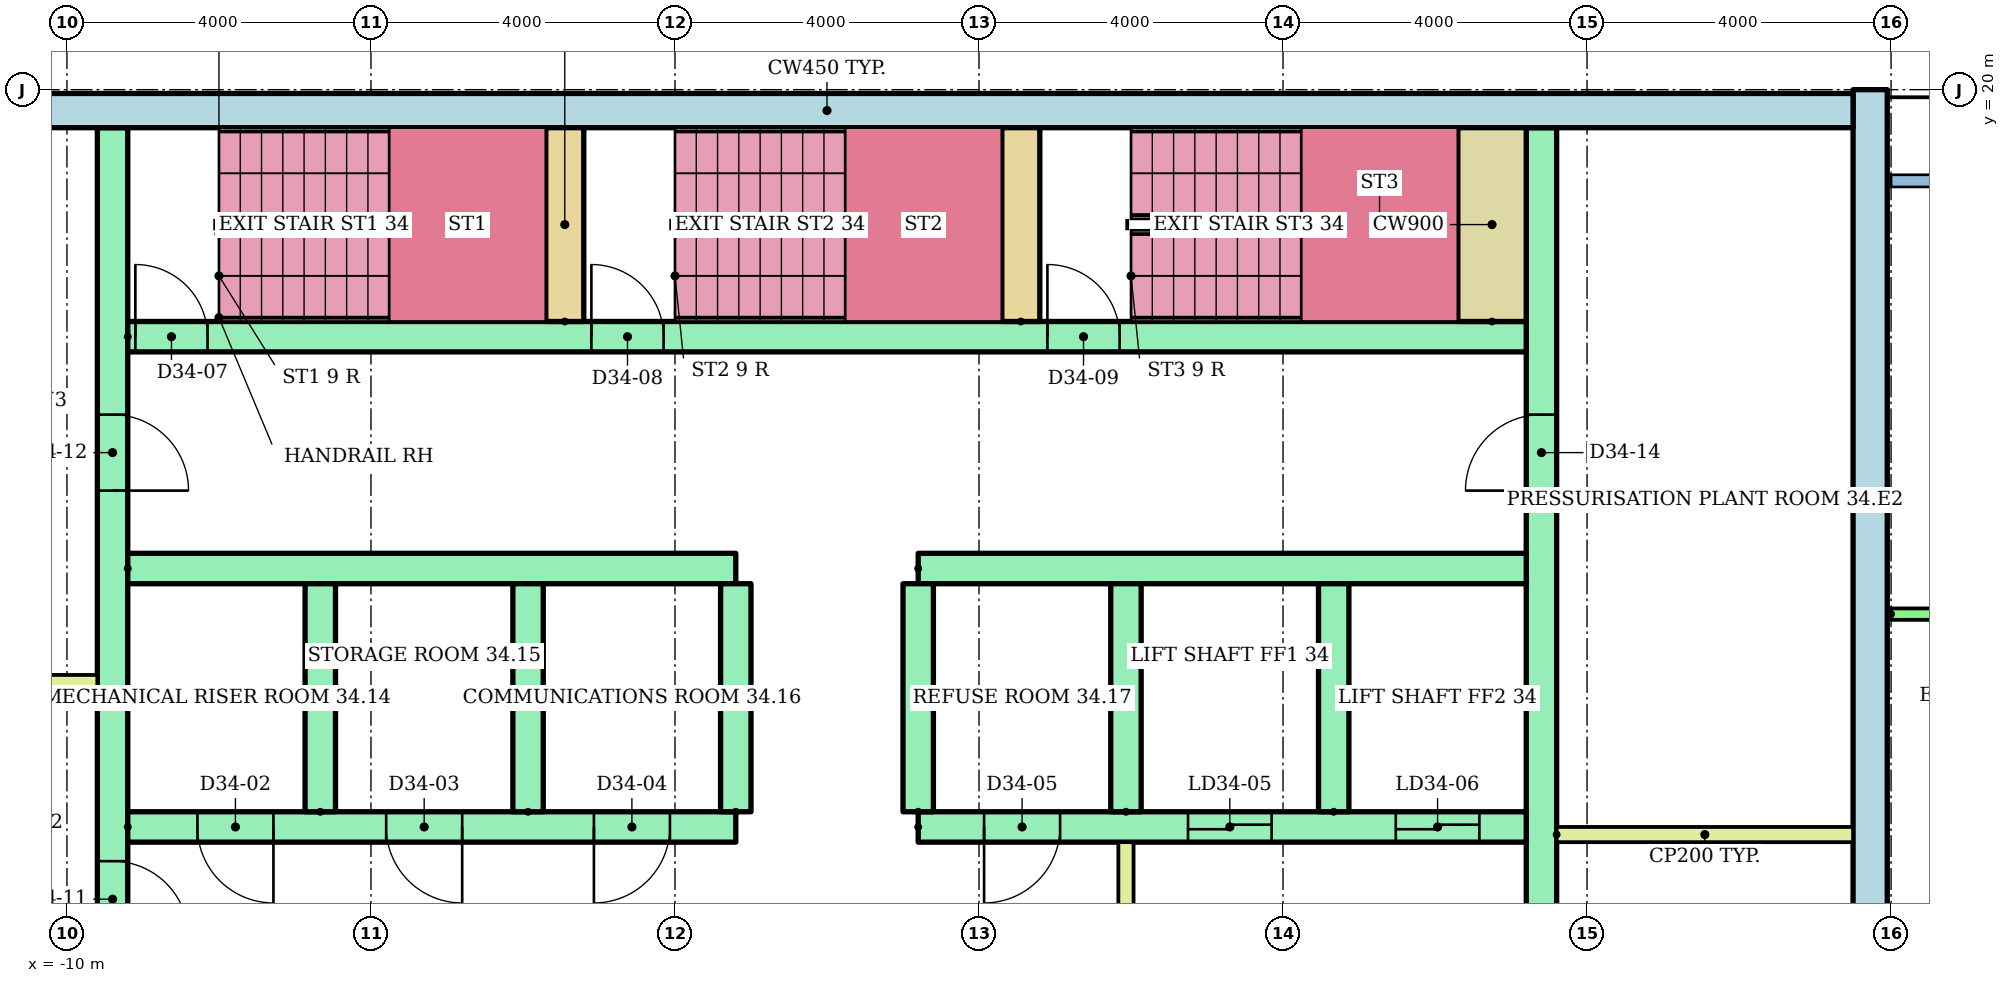
"""IFC4 building model, lengths in metres.
Left out: names, types, materials, properties, quantities, classifications, styles, units other than length and angle.
Written with IfcOpenShell. Run it as: python <this file> out.ifc"""

import sys

from ifc_helpers import new_model, si_unit, direction, frame, frame_2d, origin, place, context, subcontext, project, spatial, rectangle, extrude, element, fill, save


model = new_model("IFC4")
c1 = context("Model", 3, precision=1e-05, world=origin(), true_north=direction((0.0, 1.0)))
c2 = subcontext(c1, "Body", "Model", "MODEL_VIEW")
j1 = project(units=[si_unit("LENGTHUNIT", "METRE"), si_unit("PLANEANGLEUNIT", "RADIAN")], contexts=[c1])
p1 = place(None, origin())
s1 = spatial("IfcSite", under=j1, at=p1, CompositionType="ELEMENT")
p2 = place(p1, origin())
s2 = spatial("IfcBuilding", under=s1, at=p2, CompositionType="ELEMENT")
p3 = place(p2, frame((0.0, 0.0, 132.6)))
s3 = spatial("IfcBuildingStorey", under=s2, at=p3, CompositionType="ELEMENT", Elevation=132.6)
p4 = place(p3, frame((13.725, 3.0, 0.0), z_axis=(0.0, 0.0, 1.0), x_axis=(0.0, 1.0, 0.0)))
e1 = element("IfcWall", 1, at=p4, inside=s3, PredefinedType="SHEAR", context=c2, shape_type="SweptSolid", body=[
    extrude(rectangle(XDim=17.0, YDim=0.45, at=frame_2d((8.5, 0.0))), origin(), (0.0, 0.0, 1.0), 2.92),
])
p5 = place(p3, frame((-13.5, 19.725, 0.0)))
e2 = element("IfcWall", 2, at=p5, inside=s3, PredefinedType="SHEAR", context=c2, shape_type="SweptSolid", body=[
    extrude(rectangle(XDim=27.0, YDim=0.45, at=frame_2d((13.5, 0.0))), origin(), (0.0, 0.0, 1.0), 2.92),
])
p6 = place(p3, frame((-9.4, 6.8, 0.0), z_axis=(0.0, 0.0, 1.0), x_axis=(0.0, 1.0, 0.0)))
e3 = element("IfcWall", 3, at=p6, inside=s3, PredefinedType="SHEAR", context=c2, shape_type="SweptSolid", body=[
    extrude(rectangle(XDim=12.7, YDim=0.4, at=frame_2d((6.35, 0.0))), origin(), (0.0, 0.0, 1.0), 2.92),
])
p7 = place(p6, frame((0.3, 0.0, 0.0)))
e4 = element("IfcOpeningElement", 4, at=p7, cuts=e3, PredefinedType="OPENING", context=c2, shape_type="SweptSolid", body=[
    extrude(rectangle(XDim=1.0, YDim=2.1, at=frame_2d((0.5, 1.05))), frame((0.0, 0.21, 0.0), z_axis=(0.0, -1.0, 0.0), x_axis=(1.0, 0.0, 0.0)), (0.0, 0.0, 1.0), 0.42),
])
p8 = place(p6, frame((2.05, 0.0, 0.0)))
e5 = element("IfcOpeningElement", 5, at=p8, cuts=e3, PredefinedType="OPENING", context=c2, shape_type="SweptSolid", body=[
    extrude(rectangle(XDim=1.0, YDim=2.1, at=frame_2d((0.5, 1.05))), frame((0.0, 0.21, 0.0), z_axis=(0.0, -1.0, 0.0), x_axis=(1.0, 0.0, 0.0)), (0.0, 0.0, 1.0), 0.42),
])
p9 = place(p6, frame((7.925, 0.0, 0.0)))
e6 = element("IfcOpeningElement", 6, at=p9, cuts=e3, PredefinedType="OPENING", context=c2, shape_type="SweptSolid", body=[
    extrude(rectangle(XDim=1.0, YDim=2.1, at=frame_2d((0.5, 1.05))), frame((0.0, 0.21, 0.0), z_axis=(0.0, -1.0, 0.0), x_axis=(1.0, 0.0, 0.0)), (0.0, 0.0, 1.0), 0.42),
])
p10 = place(p3, frame((9.4, 6.8, 0.0), z_axis=(0.0, 0.0, 1.0), x_axis=(0.0, 1.0, 0.0)))
e7 = element("IfcWall", 7, at=p10, inside=s3, PredefinedType="SHEAR", context=c2, shape_type="SweptSolid", body=[
    extrude(rectangle(XDim=12.7, YDim=0.4, at=frame_2d((6.35, 0.0))), origin(), (0.0, 0.0, 1.0), 2.92),
])
p11 = place(p10, frame((1.15, 0.0, 0.0)))
e8 = element("IfcOpeningElement", 8, at=p11, cuts=e7, PredefinedType="OPENING", context=c2, shape_type="SweptSolid", body=[
    extrude(rectangle(XDim=1.0, YDim=2.1, at=frame_2d((0.5, 1.05))), frame((0.0, 0.21, 0.0), z_axis=(0.0, -1.0, 0.0), x_axis=(1.0, 0.0, 0.0)), (0.0, 0.0, 1.0), 0.42),
])
p12 = place(p10, frame((7.925, 0.0, 0.0)))
e9 = element("IfcOpeningElement", 9, at=p12, cuts=e7, PredefinedType="OPENING", context=c2, shape_type="SweptSolid", body=[
    extrude(rectangle(XDim=1.0, YDim=2.1, at=frame_2d((0.5, 1.05))), frame((0.0, 0.21, 0.0), z_axis=(0.0, -1.0, 0.0), x_axis=(1.0, 0.0, 0.0)), (0.0, 0.0, 1.0), 0.42),
])
p13 = place(p3, frame((-9.2, 10.3, 0.0)))
e10 = element("IfcWall", 10, at=p13, inside=s3, PredefinedType="SHEAR", context=c2, shape_type="SweptSolid", body=[
    extrude(rectangle(XDim=8.0, YDim=0.4, at=frame_2d((4.0, 0.0))), origin(), (0.0, 0.0, 1.0), 2.92),
])
p14 = place(p13, frame((0.917, 0.0, 0.0)))
e11 = element("IfcOpeningElement", 11, at=p14, cuts=e10, PredefinedType="OPENING", context=c2, shape_type="SweptSolid", body=[
    extrude(rectangle(XDim=1.0, YDim=2.1, at=frame_2d((0.5, 1.05))), frame((0.0, 0.21, 0.0), z_axis=(0.0, -1.0, 0.0), x_axis=(1.0, 0.0, 0.0)), (0.0, 0.0, 1.0), 0.42),
])
p15 = place(p13, frame((3.4, 0.0, 0.0)))
e12 = element("IfcOpeningElement", 12, at=p15, cuts=e10, PredefinedType="OPENING", context=c2, shape_type="SweptSolid", body=[
    extrude(rectangle(XDim=1.0, YDim=2.1, at=frame_2d((0.5, 1.05))), frame((0.0, 0.21, 0.0), z_axis=(0.0, -1.0, 0.0), x_axis=(1.0, 0.0, 0.0)), (0.0, 0.0, 1.0), 0.42),
])
p16 = place(p13, frame((6.133, 0.0, 0.0)))
e13 = element("IfcOpeningElement", 13, at=p16, cuts=e10, PredefinedType="OPENING", context=c2, shape_type="SweptSolid", body=[
    extrude(rectangle(XDim=1.0, YDim=2.1, at=frame_2d((0.5, 1.05))), frame((0.0, 0.21, 0.0), z_axis=(0.0, -1.0, 0.0), x_axis=(1.0, 0.0, 0.0)), (0.0, 0.0, 1.0), 0.42),
])
p17 = place(p3, frame((-9.2, 13.7, 0.0)))
e14 = element("IfcWall", 14, at=p17, inside=s3, PredefinedType="SHEAR", context=c2, shape_type="SweptSolid", body=[
    extrude(rectangle(XDim=8.0, YDim=0.4, at=frame_2d((4.0, 0.0))), origin(), (0.0, 0.0, 1.0), 2.92),
])
p18 = place(p3, frame((1.2, 10.3, 0.0)))
e15 = element("IfcWall", 15, at=p18, inside=s3, PredefinedType="SHEAR", context=c2, shape_type="SweptSolid", body=[
    extrude(rectangle(XDim=8.0, YDim=0.4, at=frame_2d((4.0, 0.0))), origin(), (0.0, 0.0, 1.0), 2.92),
])
p19 = place(p18, frame((3.55, 0.0, 0.0)))
e16 = element("IfcOpeningElement", 16, at=p19, cuts=e15, PredefinedType="OPENING", context=c2, shape_type="SweptSolid", body=[
    extrude(rectangle(XDim=1.1, YDim=2.1, at=frame_2d((0.55, 1.05))), frame((0.0, 0.21, 0.0), z_axis=(0.0, -1.0, 0.0), x_axis=(1.0, 0.0, 0.0)), (0.0, 0.0, 1.0), 0.42),
])
p20 = place(p18, frame((6.283, 0.0, 0.0)))
e17 = element("IfcOpeningElement", 17, at=p20, cuts=e15, PredefinedType="OPENING", context=c2, shape_type="SweptSolid", body=[
    extrude(rectangle(XDim=1.1, YDim=2.1, at=frame_2d((0.55, 1.05))), frame((0.0, 0.21, 0.0), z_axis=(0.0, -1.0, 0.0), x_axis=(1.0, 0.0, 0.0)), (0.0, 0.0, 1.0), 0.42),
])
p21 = place(p18, frame((0.867, 0.0, 0.0)))
e18 = element("IfcOpeningElement", 18, at=p21, cuts=e15, PredefinedType="OPENING", context=c2, shape_type="SweptSolid", body=[
    extrude(rectangle(XDim=1.0, YDim=2.1, at=frame_2d((0.5, 1.05))), frame((0.0, 0.21, 0.0), z_axis=(0.0, -1.0, 0.0), x_axis=(1.0, 0.0, 0.0)), (0.0, 0.0, 1.0), 0.42),
])
p22 = place(p3, frame((1.2, 13.7, 0.0)))
e19 = element("IfcWall", 19, at=p22, inside=s3, PredefinedType="SHEAR", context=c2, shape_type="SweptSolid", body=[
    extrude(rectangle(XDim=8.0, YDim=0.4, at=frame_2d((4.0, 0.0))), origin(), (0.0, 0.0, 1.0), 2.92),
])
for number, where, z_axis, x_axis in (
    (20, (-6.667, 10.5, 0.0), (0.0, 0.0, 1.0), (0.0, 1.0, 0.0)),
    (21, (-3.933, 10.5, 0.0), (0.0, 0.0, 1.0), (0.0, 1.0, 0.0)),
    (22, (-1.2, 10.5, 0.0), (0.0, 0.0, 1.0), (0.0, 1.0, 0.0)),
    (23, (1.2, 10.5, 0.0), (0.0, 0.0, 1.0), (0.0, 1.0, 0.0)),
    (24, (3.933, 10.5, 0.0), (0.0, 0.0, 1.0), (0.0, 1.0, 0.0)),
    (25, (6.667, 10.5, 0.0), (0.0, 0.0, 1.0), (0.0, 1.0, 0.0)),
):
    element("IfcWall", number, at=place(p3, frame(where, z_axis=z_axis, x_axis=x_axis)), inside=s3, PredefinedType="SHEAR", context=c2, shape_type="SweptSolid", body=[
        extrude(rectangle(XDim=3.0, YDim=0.4, at=frame_2d((1.5, 0.0))), origin(), (0.0, 0.0, 1.0), 2.92),
    ])
p23 = place(p3, frame((3.933, 6.8, 0.0), z_axis=(0.0, 0.0, 1.0), x_axis=(0.0, 1.0, 0.0)))
e26 = element("IfcWall", 26, at=p23, inside=s3, PredefinedType="PARTITIONING", context=c2, shape_type="SweptSolid", body=[
    extrude(rectangle(XDim=3.3, YDim=0.2, at=frame_2d((1.65, 0.0))), origin(), (0.0, 0.0, 1.0), 2.92),
])
p24 = place(p23, frame((1.1, 0.0, 0.0)))
e27 = element("IfcOpeningElement", 27, at=p24, cuts=e26, PredefinedType="OPENING", context=c2, shape_type="SweptSolid", body=[
    extrude(rectangle(XDim=1.1, YDim=2.1, at=frame_2d((0.55, 1.05))), frame((0.0, 0.11, 0.0), z_axis=(0.0, -1.0, 0.0), x_axis=(1.0, 0.0, 0.0)), (0.0, 0.0, 1.0), 0.22),
])
p25 = place(p3, frame((-9.2, 16.75, 0.0)))
e28 = element("IfcWall", 28, at=p25, inside=s3, PredefinedType="SHEAR", context=c2, shape_type="SweptSolid", body=[
    extrude(rectangle(XDim=18.4, YDim=0.4, at=frame_2d((9.2, 0.0))), origin(), (0.0, 0.0, 1.0), 2.92),
])
p26 = place(p25, frame((0.1, 0.0, 0.0)))
e29 = element("IfcOpeningElement", 29, at=p26, cuts=e28, PredefinedType="OPENING", context=c2, shape_type="SweptSolid", body=[
    extrude(rectangle(XDim=0.95, YDim=2.1, at=frame_2d((0.475, 1.05))), frame((0.0, 0.21, 0.0), z_axis=(0.0, -1.0, 0.0), x_axis=(1.0, 0.0, 0.0)), (0.0, 0.0, 1.0), 0.42),
])
p27 = place(p25, frame((6.1, 0.0, 0.0)))
e30 = element("IfcOpeningElement", 30, at=p27, cuts=e28, PredefinedType="OPENING", context=c2, shape_type="SweptSolid", body=[
    extrude(rectangle(XDim=0.95, YDim=2.1, at=frame_2d((0.475, 1.05))), frame((0.0, 0.21, 0.0), z_axis=(0.0, -1.0, 0.0), x_axis=(1.0, 0.0, 0.0)), (0.0, 0.0, 1.0), 0.42),
])
p28 = place(p25, frame((12.1, 0.0, 0.0)))
e31 = element("IfcOpeningElement", 31, at=p28, cuts=e28, PredefinedType="OPENING", context=c2, shape_type="SweptSolid", body=[
    extrude(rectangle(XDim=0.95, YDim=2.1, at=frame_2d((0.475, 1.05))), frame((0.0, 0.21, 0.0), z_axis=(0.0, -1.0, 0.0), x_axis=(1.0, 0.0, 0.0)), (0.0, 0.0, 1.0), 0.42),
])
for number, where, z_axis, x_axis in (
    (32, (-3.45, 16.95, 0.0), (0.0, 0.0, 1.0), (0.0, 1.0, 0.0)),
    (33, (2.55, 16.95, 0.0), (0.0, 0.0, 1.0), (0.0, 1.0, 0.0)),
):
    element("IfcWall", number, at=place(p3, frame(where, z_axis=z_axis, x_axis=x_axis)), inside=s3, PredefinedType="SHEAR", context=c2, shape_type="SweptSolid", body=[
        extrude(rectangle(XDim=2.55, YDim=0.5, at=frame_2d((1.275, 0.0))), origin(), (0.0, 0.0, 1.0), 2.92),
    ])
p29 = place(p3, frame((8.75, 16.95, 0.0), z_axis=(0.0, 0.0, 1.0), x_axis=(0.0, 1.0, 0.0)))
e34 = element("IfcWall", 34, at=p29, inside=s3, PredefinedType="SHEAR", context=c2, shape_type="SweptSolid", body=[
    extrude(rectangle(XDim=2.55, YDim=0.9, at=frame_2d((1.275, 0.0))), origin(), (0.0, 0.0, 1.0), 2.92),
])
for number, where in (
    (35, (-13.5, 12.2, 0.0)),
    (36, (9.6, 10.2, 0.0)),
):
    element("IfcWall", number, at=place(p3, frame(where)), inside=s3, PredefinedType="PARTITIONING", context=c2, shape_type="SweptSolid", body=[
        extrude(rectangle(XDim=3.9, YDim=0.2, at=frame_2d((1.95, 0.0))), origin(), (0.0, 0.0, 1.0), 2.92),
    ])
p30 = place(p3, frame((14.0, 13.1, 0.0)))
e37 = element("IfcWall", 37, at=p30, inside=s3, PredefinedType="PARTITIONING", context=c2, shape_type="SweptSolid", body=[
    extrude(rectangle(XDim=18.72, YDim=0.15, at=frame_2d((9.36, 0.0))), origin(), (0.0, 0.0, 1.0), 2.4),
])
p31 = place(p30, frame((5.5, 0.0, 0.0)))
e38 = element("IfcOpeningElement", 38, at=p31, cuts=e37, PredefinedType="OPENING", context=c2, shape_type="SweptSolid", body=[
    extrude(rectangle(XDim=1.0, YDim=2.1, at=frame_2d((0.5, 1.05))), frame((0.0, 0.085, 0.0), z_axis=(0.0, -1.0, 0.0), x_axis=(1.0, 0.0, 0.0)), (0.0, 0.0, 1.0), 0.17),
])
p32 = place(p30, frame((14.8, 0.0, 0.0)))
e39 = element("IfcOpeningElement", 39, at=p32, cuts=e37, PredefinedType="OPENING", context=c2, shape_type="SweptSolid", body=[
    extrude(rectangle(XDim=0.9, YDim=2.1, at=frame_2d((0.45, 1.05))), frame((0.0, 0.085, 0.0), z_axis=(0.0, -1.0, 0.0), x_axis=(1.0, 0.0, 0.0)), (0.0, 0.0, 1.0), 0.17),
])
p33 = place(p19, origin())
e40 = element("IfcDoor", 40, at=p33, inside=s3, OperationType="SLIDING_TO_LEFT", PredefinedType="DOOR", context=c2, shape_type="SweptSolid", body=[
    extrude(rectangle(XDim=1.1, YDim=2.1, at=frame_2d((0.55, 1.05))), frame((0.0, 0.025, 0.0), z_axis=(0.0, -1.0, 0.0), x_axis=(1.0, 0.0, 0.0)), (0.0, 0.0, 1.0), 0.05),
])
fill(e16, e40)
p34 = place(p20, origin())
e41 = element("IfcDoor", 41, at=p34, inside=s3, OperationType="SLIDING_TO_LEFT", PredefinedType="DOOR", context=c2, shape_type="SweptSolid", body=[
    extrude(rectangle(XDim=1.1, YDim=2.1, at=frame_2d((0.55, 1.05))), frame((0.0, 0.025, 0.0), z_axis=(0.0, -1.0, 0.0), x_axis=(1.0, 0.0, 0.0)), (0.0, 0.0, 1.0), 0.05),
])
fill(e17, e41)
p35 = place(p14, frame((1.0, 0.0, 0.0), z_axis=(0.0, 0.0, 1.0), x_axis=(-1.0, 0.0, 0.0)))
e42 = element("IfcDoor", 42, at=p35, inside=s3, OperationType="SINGLE_SWING_RIGHT", PredefinedType="DOOR", context=c2, shape_type="SweptSolid", body=[
    extrude(rectangle(XDim=1.0, YDim=2.1, at=frame_2d((0.5, 1.05))), frame((0.0, 0.025, 0.0), z_axis=(0.0, -1.0, 0.0), x_axis=(1.0, 0.0, 0.0)), (0.0, 0.0, 1.0), 0.05),
])
fill(e11, e42)
p36 = place(p15, frame((1.0, 0.0, 0.0), z_axis=(0.0, 0.0, 1.0), x_axis=(-1.0, 0.0, 0.0)))
e43 = element("IfcDoor", 43, at=p36, inside=s3, OperationType="SINGLE_SWING_RIGHT", PredefinedType="DOOR", context=c2, shape_type="SweptSolid", body=[
    extrude(rectangle(XDim=1.0, YDim=2.1, at=frame_2d((0.5, 1.05))), frame((0.0, 0.025, 0.0), z_axis=(0.0, -1.0, 0.0), x_axis=(1.0, 0.0, 0.0)), (0.0, 0.0, 1.0), 0.05),
])
fill(e12, e43)
p37 = place(p16, frame((1.0, 0.0, 0.0), z_axis=(0.0, 0.0, 1.0), x_axis=(-1.0, 0.0, 0.0)))
e44 = element("IfcDoor", 44, at=p37, inside=s3, OperationType="SINGLE_SWING_LEFT", PredefinedType="DOOR", context=c2, shape_type="SweptSolid", body=[
    extrude(rectangle(XDim=1.0, YDim=2.1, at=frame_2d((0.5, 1.05))), frame((0.0, 0.025, 0.0), z_axis=(0.0, -1.0, 0.0), x_axis=(1.0, 0.0, 0.0)), (0.0, 0.0, 1.0), 0.05),
])
fill(e13, e44)
p38 = place(p21, frame((1.0, 0.0, 0.0), z_axis=(0.0, 0.0, 1.0), x_axis=(-1.0, 0.0, 0.0)))
e45 = element("IfcDoor", 45, at=p38, inside=s3, OperationType="SINGLE_SWING_LEFT", PredefinedType="DOOR", context=c2, shape_type="SweptSolid", body=[
    extrude(rectangle(XDim=1.0, YDim=2.1, at=frame_2d((0.5, 1.05))), frame((0.0, 0.025, 0.0), z_axis=(0.0, -1.0, 0.0), x_axis=(1.0, 0.0, 0.0)), (0.0, 0.0, 1.0), 0.05),
])
fill(e18, e45)
p39 = place(p26, origin())
e46 = element("IfcDoor", 46, at=p39, inside=s3, OperationType="SINGLE_SWING_LEFT", PredefinedType="DOOR", context=c2, shape_type="SweptSolid", body=[
    extrude(rectangle(XDim=0.95, YDim=2.1, at=frame_2d((0.475, 1.05))), frame((0.0, 0.025, 0.0), z_axis=(0.0, -1.0, 0.0), x_axis=(1.0, 0.0, 0.0)), (0.0, 0.0, 1.0), 0.05),
])
fill(e29, e46)
p40 = place(p27, origin())
e47 = element("IfcDoor", 47, at=p40, inside=s3, OperationType="SINGLE_SWING_LEFT", PredefinedType="DOOR", context=c2, shape_type="SweptSolid", body=[
    extrude(rectangle(XDim=0.95, YDim=2.1, at=frame_2d((0.475, 1.05))), frame((0.0, 0.025, 0.0), z_axis=(0.0, -1.0, 0.0), x_axis=(1.0, 0.0, 0.0)), (0.0, 0.0, 1.0), 0.05),
])
fill(e30, e47)
p41 = place(p28, origin())
e48 = element("IfcDoor", 48, at=p41, inside=s3, OperationType="SINGLE_SWING_LEFT", PredefinedType="DOOR", context=c2, shape_type="SweptSolid", body=[
    extrude(rectangle(XDim=0.95, YDim=2.1, at=frame_2d((0.475, 1.05))), frame((0.0, 0.025, 0.0), z_axis=(0.0, -1.0, 0.0), x_axis=(1.0, 0.0, 0.0)), (0.0, 0.0, 1.0), 0.05),
])
fill(e31, e48)
p42 = place(p8, frame((1.0, 0.0, 0.0), z_axis=(0.0, 0.0, 1.0), x_axis=(-1.0, 0.0, 0.0)))
e49 = element("IfcDoor", 49, at=p42, inside=s3, OperationType="SINGLE_SWING_LEFT", PredefinedType="DOOR", context=c2, shape_type="SweptSolid", body=[
    extrude(rectangle(XDim=1.0, YDim=2.1, at=frame_2d((0.5, 1.05))), frame((0.0, 0.025, 0.0), z_axis=(0.0, -1.0, 0.0), x_axis=(1.0, 0.0, 0.0)), (0.0, 0.0, 1.0), 0.05),
])
fill(e5, e49)
p43 = place(p9, frame((1.0, 0.0, 0.0), z_axis=(0.0, 0.0, 1.0), x_axis=(-1.0, 0.0, 0.0)))
e50 = element("IfcDoor", 50, at=p43, inside=s3, OperationType="SINGLE_SWING_LEFT", PredefinedType="DOOR", context=c2, shape_type="SweptSolid", body=[
    extrude(rectangle(XDim=1.0, YDim=2.1, at=frame_2d((0.5, 1.05))), frame((0.0, 0.025, 0.0), z_axis=(0.0, -1.0, 0.0), x_axis=(1.0, 0.0, 0.0)), (0.0, 0.0, 1.0), 0.05),
])
fill(e6, e50)
p44 = place(p12, origin())
e51 = element("IfcDoor", 51, at=p44, inside=s3, OperationType="SINGLE_SWING_LEFT", PredefinedType="DOOR", context=c2, shape_type="SweptSolid", body=[
    extrude(rectangle(XDim=1.0, YDim=2.1, at=frame_2d((0.5, 1.05))), frame((0.0, 0.025, 0.0), z_axis=(0.0, -1.0, 0.0), x_axis=(1.0, 0.0, 0.0)), (0.0, 0.0, 1.0), 0.05),
])
fill(e9, e51)
save(model, sys.argv[1])
